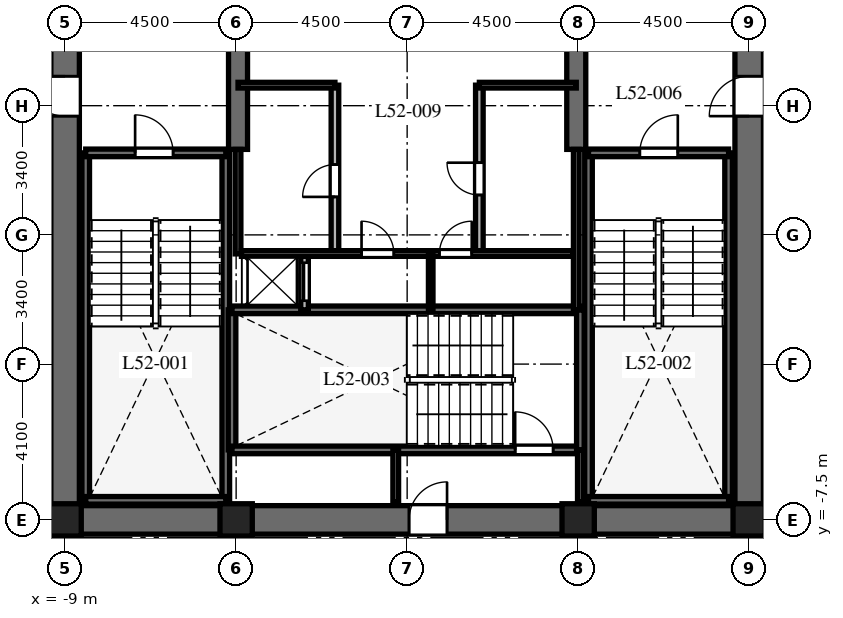
"""IFC4 building model, lengths in metres.
Left out: names, types, materials, properties, quantities, classifications, styles, units other than length and angle.
Written with IfcOpenShell. Run it as: python <this file> out.ifc"""

import sys

from ifc_helpers import new_model, si_unit, direction, frame, frame_2d, origin, origin_2d, place, context, subcontext, project, spatial, rectangle, extrude, element, fill, save


model = new_model("IFC4")
c1 = context("Model", 3, precision=1e-05, world=origin(), true_north=direction((0.0, 1.0)))
c2 = subcontext(c1, "Body", "Model", "MODEL_VIEW")
j1 = project(units=[si_unit("LENGTHUNIT", "METRE"), si_unit("PLANEANGLEUNIT", "RADIAN")], contexts=[c1])
p1 = place(None, origin())
s1 = spatial("IfcSite", under=j1, at=p1, CompositionType="ELEMENT")
p2 = place(p1, origin())
s2 = spatial("IfcBuilding", under=s1, at=p2, CompositionType="ELEMENT")
p3 = place(p2, frame((0.0, 0.0, 210.3)))
s3 = spatial("IfcBuildingStorey", under=s2, at=p3, CompositionType="ELEMENT", Elevation=210.3)
p4 = place(p3, frame((-9.375, -7.5, 0.0), z_axis=(0.0, 0.0, 1.0), x_axis=(1.0, 0.0, 0.0)))
e1 = element("IfcWall", 1, at=p4, inside=s3, PredefinedType="SHEAR", context=c2, shape_type="SweptSolid", body=[
    extrude(rectangle(XDim=18.75, YDim=0.75, at=frame_2d((9.375, 0.0))), origin(), (0.0, 0.0, 1.0), 3.8),
])
p5 = place(p4, frame((9.425, 0.0, 0.0)))
e2 = element("IfcOpeningElement", 2, at=p5, cuts=e1, PredefinedType="OPENING", context=c2, shape_type="SweptSolid", body=[
    extrude(rectangle(XDim=1.0, YDim=2.15, at=frame_2d((0.5, 1.075))), frame((0.0, 0.385, 0.0), z_axis=(0.0, -1.0, 0.0), x_axis=(1.0, 0.0, 0.0)), (0.0, 0.0, 1.0), 0.77),
])
p6 = place(p3, frame((-9.0, -7.125, 0.0), z_axis=(0.0, 0.0, 1.0), x_axis=(0.0, 1.0, 0.0)))
e3 = element("IfcWall", 3, at=p6, inside=s3, PredefinedType="SHEAR", context=c2, shape_type="SweptSolid", body=[
    extrude(rectangle(XDim=14.25, YDim=0.75, at=frame_2d((7.125, 0.0))), origin(), (0.0, 0.0, 1.0), 3.8),
])
p7 = place(p6, frame((10.25, 0.0, 0.0)))
e4 = element("IfcOpeningElement", 4, at=p7, cuts=e3, PredefinedType="OPENING", context=c2, shape_type="SweptSolid", body=[
    extrude(rectangle(XDim=1.05, YDim=2.15, at=frame_2d((0.525, 1.075))), frame((0.0, 0.385, 0.0), z_axis=(0.0, -1.0, 0.0), x_axis=(1.0, 0.0, 0.0)), (0.0, 0.0, 1.0), 0.77),
])
p8 = place(p3, frame((9.0, -7.125, 0.0), z_axis=(0.0, 0.0, 1.0), x_axis=(0.0, 1.0, 0.0)))
e5 = element("IfcWall", 5, at=p8, inside=s3, PredefinedType="SHEAR", context=c2, shape_type="SweptSolid", body=[
    extrude(rectangle(XDim=14.25, YDim=0.75, at=frame_2d((7.125, 0.0))), origin(), (0.0, 0.0, 1.0), 3.8),
])
p9 = place(p8, frame((10.25, 0.0, 0.0)))
e6 = element("IfcOpeningElement", 6, at=p9, cuts=e5, PredefinedType="OPENING", context=c2, shape_type="SweptSolid", body=[
    extrude(rectangle(XDim=1.05, YDim=2.15, at=frame_2d((0.525, 1.075))), frame((0.0, 0.385, 0.0), z_axis=(0.0, -1.0, 0.0), x_axis=(1.0, 0.0, 0.0)), (0.0, 0.0, 1.0), 0.77),
])
for number, where, z_axis, x_axis in (
    (7, (-4.45, 2.25, 0.0), (0.0, 0.0, 1.0), (0.0, 1.0, 0.0)),
    (8, (4.45, 2.25, 0.0), (0.0, 0.0, 1.0), (0.0, 1.0, 0.0)),
):
    element("IfcWall", number, at=place(p3, frame(where, z_axis=z_axis, x_axis=x_axis)), inside=s3, PredefinedType="SHEAR", context=c2, shape_type="SweptSolid", body=[
        extrude(rectangle(XDim=4.875, YDim=0.5, at=frame_2d((2.438, 0.0))), origin(), (0.0, 0.0, 1.0), 3.8),
    ])
for number, where, z_axis, x_axis in (
    (9, (-8.458, -6.985, 0.0), (0.0, 0.0, 1.0), (0.0, 1.0, 0.0)),
    (10, (-4.772, -6.985, 0.0), (0.0, 0.0, 1.0), (0.0, 1.0, 0.0)),
):
    element("IfcWall", number, at=place(p3, frame(where, z_axis=z_axis, x_axis=x_axis)), inside=s3, PredefinedType="SHEAR", context=c2, shape_type="SweptSolid", body=[
        extrude(rectangle(XDim=9.143, YDim=0.2, at=frame_2d((4.572, 0.0))), origin(), (0.0, 0.0, 1.0), 3.8),
    ])
p10 = place(p3, frame((-8.458, -6.985, 0.0), z_axis=(0.0, 0.0, 1.0), x_axis=(1.0, 0.0, 0.0)))
e11 = element("IfcWall", 11, at=p10, inside=s3, PredefinedType="SHEAR", context=c2, shape_type="SweptSolid", body=[
    extrude(rectangle(XDim=3.686, YDim=0.2, at=frame_2d((1.843, 0.0))), origin(), (0.0, 0.0, 1.0), 3.8),
])
p11 = place(p3, frame((-8.458, 2.158, 0.0), z_axis=(0.0, 0.0, 1.0), x_axis=(1.0, 0.0, 0.0)))
e12 = element("IfcWall", 12, at=p11, inside=s3, PredefinedType="SHEAR", context=c2, shape_type="SweptSolid", body=[
    extrude(rectangle(XDim=3.686, YDim=0.2, at=frame_2d((1.843, 0.0))), origin(), (0.0, 0.0, 1.0), 3.8),
])
p12 = place(p11, frame((1.3, 0.0, 0.0)))
e13 = element("IfcOpeningElement", 13, at=p12, cuts=e12, PredefinedType="OPENING", context=c2, shape_type="SweptSolid", body=[
    extrude(rectangle(XDim=1.0, YDim=2.15, at=frame_2d((0.5, 1.075))), frame((0.0, 0.11, 0.0), z_axis=(0.0, -1.0, 0.0), x_axis=(1.0, 0.0, 0.0)), (0.0, 0.0, 1.0), 0.22),
])
for number, where, z_axis, x_axis in (
    (14, (4.772, -6.985, 0.0), (0.0, 0.0, 1.0), (0.0, 1.0, 0.0)),
    (15, (8.458, -6.985, 0.0), (0.0, 0.0, 1.0), (0.0, 1.0, 0.0)),
):
    element("IfcWall", number, at=place(p3, frame(where, z_axis=z_axis, x_axis=x_axis)), inside=s3, PredefinedType="SHEAR", context=c2, shape_type="SweptSolid", body=[
        extrude(rectangle(XDim=9.143, YDim=0.2, at=frame_2d((4.572, 0.0))), origin(), (0.0, 0.0, 1.0), 3.8),
    ])
p13 = place(p3, frame((4.772, -6.985, 0.0), z_axis=(0.0, 0.0, 1.0), x_axis=(1.0, 0.0, 0.0)))
e16 = element("IfcWall", 16, at=p13, inside=s3, PredefinedType="SHEAR", context=c2, shape_type="SweptSolid", body=[
    extrude(rectangle(XDim=3.686, YDim=0.2, at=frame_2d((1.843, 0.0))), origin(), (0.0, 0.0, 1.0), 3.8),
])
p14 = place(p3, frame((4.772, 2.158, 0.0), z_axis=(0.0, 0.0, 1.0), x_axis=(1.0, 0.0, 0.0)))
e17 = element("IfcWall", 17, at=p14, inside=s3, PredefinedType="SHEAR", context=c2, shape_type="SweptSolid", body=[
    extrude(rectangle(XDim=3.686, YDim=0.2, at=frame_2d((1.843, 0.0))), origin(), (0.0, 0.0, 1.0), 3.8),
])
p15 = place(p14, frame((1.35, 0.0, 0.0)))
e18 = element("IfcOpeningElement", 18, at=p15, cuts=e17, PredefinedType="OPENING", context=c2, shape_type="SweptSolid", body=[
    extrude(rectangle(XDim=1.0, YDim=2.15, at=frame_2d((0.5, 1.075))), frame((0.0, 0.11, 0.0), z_axis=(0.0, -1.0, 0.0), x_axis=(1.0, 0.0, 0.0)), (0.0, 0.0, 1.0), 0.22),
])
p16 = place(p3, frame((-4.608, -5.658, 0.0), z_axis=(0.0, 0.0, 1.0), x_axis=(0.0, 1.0, 0.0)))
e19 = element("IfcWall", 19, at=p16, inside=s3, PredefinedType="SHEAR", context=c2, shape_type="SweptSolid", body=[
    extrude(rectangle(XDim=3.686, YDim=0.2, at=frame_2d((1.843, 0.0))), origin(), (0.0, 0.0, 1.0), 3.8),
])
p17 = place(p3, frame((-4.608, -5.658, 0.0), z_axis=(0.0, 0.0, 1.0), x_axis=(1.0, 0.0, 0.0)))
e20 = element("IfcWall", 20, at=p17, inside=s3, PredefinedType="SHEAR", context=c2, shape_type="SweptSolid", body=[
    extrude(rectangle(XDim=9.166, YDim=0.2, at=frame_2d((4.583, 0.0))), origin(), (0.0, 0.0, 1.0), 3.8),
])
p18 = place(p17, frame((7.45, 0.0, 0.0)))
e21 = element("IfcOpeningElement", 21, at=p18, cuts=e20, PredefinedType="OPENING", context=c2, shape_type="SweptSolid", body=[
    extrude(rectangle(XDim=1.0, YDim=2.15, at=frame_2d((0.5, 1.075))), frame((0.0, 0.11, 0.0), z_axis=(0.0, -1.0, 0.0), x_axis=(1.0, 0.0, 0.0)), (0.0, 0.0, 1.0), 0.22),
])
p19 = place(p3, frame((-4.608, -1.972, 0.0), z_axis=(0.0, 0.0, 1.0), x_axis=(1.0, 0.0, 0.0)))
e22 = element("IfcWall", 22, at=p19, inside=s3, PredefinedType="SHEAR", context=c2, shape_type="SweptSolid", body=[
    extrude(rectangle(XDim=9.166, YDim=0.2, at=frame_2d((4.583, 0.0))), origin(), (0.0, 0.0, 1.0), 3.8),
])
p20 = place(p3, frame((4.558, -5.658, 0.0), z_axis=(0.0, 0.0, 1.0), x_axis=(0.0, 1.0, 0.0)))
e23 = element("IfcWall", 23, at=p20, inside=s3, PredefinedType="SHEAR", context=c2, shape_type="SweptSolid", body=[
    extrude(rectangle(XDim=3.686, YDim=0.2, at=frame_2d((1.843, 0.0))), origin(), (0.0, 0.0, 1.0), 3.8),
])
for number, where, z_axis, x_axis in (
    (24, (-9.0, -7.5, 0.0), (0.0, 0.0, 1.0), (1.0, 0.0, 0.0)),
    (25, (-4.5, -7.5, 0.0), (0.0, 0.0, 1.0), (1.0, 0.0, 0.0)),
    (26, (4.5, -7.5, 0.0), (0.0, 0.0, 1.0), (1.0, 0.0, 0.0)),
    (27, (9.0, -7.5, 0.0), (0.0, 0.0, 1.0), (1.0, 0.0, 0.0)),
):
    element("IfcColumn", number, at=place(p3, frame(where, z_axis=z_axis, x_axis=x_axis)), inside=s3, PredefinedType="COLUMN", context=c2, shape_type="SweptSolid", body=[
        extrude(rectangle(XDim=0.85, YDim=0.85, at=origin_2d()), origin(), (0.0, 0.0, 1.0), 3.8),
    ])
for number, where, z_axis, x_axis in (
    (28, (-0.3, -7.02, 0.0), (0.0, 0.0, 1.0), (0.0, 1.0, 0.0)),
    (29, (4.558, -7.02, 0.0), (0.0, 0.0, 1.0), (0.0, 1.0, 0.0)),
):
    element("IfcWall", number, at=place(p3, frame(where, z_axis=z_axis, x_axis=x_axis)), inside=s3, PredefinedType="PARTITIONING", context=c2, shape_type="SweptSolid", body=[
        extrude(rectangle(XDim=1.362, YDim=0.15, at=frame_2d((0.681, 0.0))), origin(), (0.0, 0.0, 1.0), 3.5),
    ])
p21 = place(p3, frame((-2.7, -1.972, 0.0), z_axis=(0.0, 0.0, 1.0), x_axis=(0.0, 1.0, 0.0)))
e30 = element("IfcWall", 30, at=p21, inside=s3, PredefinedType="PARTITIONING", context=c2, shape_type="SweptSolid", body=[
    extrude(rectangle(XDim=1.472, YDim=0.2, at=frame_2d((0.736, 0.0))), origin(), (0.0, 0.0, 1.0), 3.5),
])
p22 = place(p21, frame((0.24, 0.0, 0.0)))
e31 = element("IfcOpeningElement", 31, at=p22, cuts=e30, PredefinedType="OPENING", context=c2, shape_type="SweptSolid", body=[
    extrude(rectangle(XDim=1.0, YDim=2.2, at=frame_2d((0.5, 1.1))), frame((0.0, 0.11, 0.0), z_axis=(0.0, -1.0, 0.0), x_axis=(1.0, 0.0, 0.0)), (0.0, 0.0, 1.0), 0.22),
])
p23 = place(p3, frame((-4.45, -0.5, 0.0), z_axis=(0.0, 0.0, 1.0), x_axis=(0.0, 1.0, 0.0)))
e32 = element("IfcWall", 32, at=p23, inside=s3, PredefinedType="PARTITIONING", context=c2, shape_type="SweptSolid", body=[
    extrude(rectangle(XDim=2.75, YDim=0.15, at=frame_2d((1.375, 0.0))), origin(), (0.0, 0.0, 1.0), 3.5),
])
p24 = place(p3, frame((4.45, -1.972, 0.0), z_axis=(0.0, 0.0, 1.0), x_axis=(0.0, 1.0, 0.0)))
e33 = element("IfcWall", 33, at=p24, inside=s3, PredefinedType="PARTITIONING", context=c2, shape_type="SweptSolid", body=[
    extrude(rectangle(XDim=4.222, YDim=0.15, at=frame_2d((2.111, 0.0))), origin(), (0.0, 0.0, 1.0), 3.5),
])
p25 = place(p3, frame((-1.9, -0.5, 0.0), z_axis=(0.0, 0.0, 1.0), x_axis=(0.0, 1.0, 0.0)))
e34 = element("IfcWall", 34, at=p25, inside=s3, PredefinedType="PARTITIONING", context=c2, shape_type="SweptSolid", body=[
    extrude(rectangle(XDim=4.44, YDim=0.2, at=frame_2d((2.22, 0.0))), origin(), (0.0, 0.0, 1.0), 3.5),
])
p26 = place(p25, frame((1.5, 0.0, 0.0)))
e35 = element("IfcOpeningElement", 35, at=p26, cuts=e34, PredefinedType="OPENING", context=c2, shape_type="SweptSolid", body=[
    extrude(rectangle(XDim=0.85, YDim=2.03, at=frame_2d((0.425, 1.015))), frame((0.0, 0.11, 0.0), z_axis=(0.0, -1.0, 0.0), x_axis=(1.0, 0.0, 0.0)), (0.0, 0.0, 1.0), 0.22),
])
p27 = place(p3, frame((-4.45, 3.94, 0.0), z_axis=(0.0, 0.0, 1.0), x_axis=(1.0, 0.0, 0.0)))
e36 = element("IfcWall", 36, at=p27, inside=s3, PredefinedType="PARTITIONING", context=c2, shape_type="SweptSolid", body=[
    extrude(rectangle(XDim=2.55, YDim=0.15, at=frame_2d((1.275, 0.0))), origin(), (0.0, 0.0, 1.0), 3.5),
])
p28 = place(p3, frame((1.9, -0.5, 0.0), z_axis=(0.0, 0.0, 1.0), x_axis=(0.0, 1.0, 0.0)))
e37 = element("IfcWall", 37, at=p28, inside=s3, PredefinedType="PARTITIONING", context=c2, shape_type="SweptSolid", body=[
    extrude(rectangle(XDim=4.44, YDim=0.2, at=frame_2d((2.22, 0.0))), origin(), (0.0, 0.0, 1.0), 3.5),
])
p29 = place(p28, frame((1.55, 0.0, 0.0)))
e38 = element("IfcOpeningElement", 38, at=p29, cuts=e37, PredefinedType="OPENING", context=c2, shape_type="SweptSolid", body=[
    extrude(rectangle(XDim=0.85, YDim=2.03, at=frame_2d((0.425, 1.015))), frame((0.0, 0.11, 0.0), z_axis=(0.0, -1.0, 0.0), x_axis=(1.0, 0.0, 0.0)), (0.0, 0.0, 1.0), 0.22),
])
p30 = place(p3, frame((1.9, 3.94, 0.0), z_axis=(0.0, 0.0, 1.0), x_axis=(1.0, 0.0, 0.0)))
e39 = element("IfcWall", 39, at=p30, inside=s3, PredefinedType="PARTITIONING", context=c2, shape_type="SweptSolid", body=[
    extrude(rectangle(XDim=2.55, YDim=0.15, at=frame_2d((1.275, 0.0))), origin(), (0.0, 0.0, 1.0), 3.5),
])
p31 = place(p3, frame((-4.36, -0.49, 0.0), z_axis=(0.0, 0.0, 1.0), x_axis=(1.0, 0.0, 0.0)))
e40 = element("IfcWall", 40, at=p31, inside=s3, PredefinedType="PARTITIONING", context=c2, shape_type="SweptSolid", body=[
    extrude(rectangle(XDim=8.72, YDim=0.15, at=frame_2d((4.36, 0.0))), origin(), (0.0, 0.0, 1.0), 3.5),
])
p32 = place(p31, frame((3.16, 0.0, 0.0)))
e41 = element("IfcOpeningElement", 41, at=p32, cuts=e40, PredefinedType="OPENING", context=c2, shape_type="SweptSolid", body=[
    extrude(rectangle(XDim=0.85, YDim=2.03, at=frame_2d((0.425, 1.015))), frame((0.0, 0.085, 0.0), z_axis=(0.0, -1.0, 0.0), x_axis=(1.0, 0.0, 0.0)), (0.0, 0.0, 1.0), 0.17),
])
p33 = place(p31, frame((5.21, 0.0, 0.0)))
e42 = element("IfcOpeningElement", 42, at=p33, cuts=e40, PredefinedType="OPENING", context=c2, shape_type="SweptSolid", body=[
    extrude(rectangle(XDim=0.85, YDim=2.03, at=frame_2d((0.425, 1.015))), frame((0.0, 0.085, 0.0), z_axis=(0.0, -1.0, 0.0), x_axis=(1.0, 0.0, 0.0)), (0.0, 0.0, 1.0), 0.17),
])
p34 = place(p3, frame((0.62, -1.972, 0.0), z_axis=(0.0, 0.0, 1.0), x_axis=(0.0, 1.0, 0.0)))
e43 = element("IfcWall", 43, at=p34, inside=s3, PredefinedType="PARTITIONING", context=c2, shape_type="SweptSolid", body=[
    extrude(rectangle(XDim=1.472, YDim=0.12, at=frame_2d((0.736, 0.0))), origin(), (0.0, 0.0, 1.0), 3.5),
])
p35 = place(p12, origin())
e44 = element("IfcDoor", 44, at=p35, inside=s3, OperationType="SINGLE_SWING_LEFT", PredefinedType="DOOR", context=c2, shape_type="SweptSolid", body=[
    extrude(rectangle(XDim=1.0, YDim=2.15, at=frame_2d((0.5, 1.075))), frame((0.0, 0.025, 0.0), z_axis=(0.0, -1.0, 0.0), x_axis=(1.0, 0.0, 0.0)), (0.0, 0.0, 1.0), 0.05),
])
fill(e13, e44)
p36 = place(p15, origin())
e45 = element("IfcDoor", 45, at=p36, inside=s3, OperationType="SINGLE_SWING_RIGHT", PredefinedType="DOOR", context=c2, shape_type="SweptSolid", body=[
    extrude(rectangle(XDim=1.0, YDim=2.15, at=frame_2d((0.5, 1.075))), frame((0.0, 0.025, 0.0), z_axis=(0.0, -1.0, 0.0), x_axis=(1.0, 0.0, 0.0)), (0.0, 0.0, 1.0), 0.05),
])
fill(e18, e45)
p37 = place(p18, origin())
e46 = element("IfcDoor", 46, at=p37, inside=s3, OperationType="SINGLE_SWING_LEFT", PredefinedType="DOOR", context=c2, shape_type="SweptSolid", body=[
    extrude(rectangle(XDim=1.0, YDim=2.15, at=frame_2d((0.5, 1.075))), frame((0.0, 0.025, 0.0), z_axis=(0.0, -1.0, 0.0), x_axis=(1.0, 0.0, 0.0)), (0.0, 0.0, 1.0), 0.05),
])
fill(e21, e46)
p38 = place(p5, origin())
e47 = element("IfcDoor", 47, at=p38, inside=s3, OperationType="SINGLE_SWING_RIGHT", PredefinedType="DOOR", context=c2, shape_type="SweptSolid", body=[
    extrude(rectangle(XDim=1.0, YDim=2.15, at=frame_2d((0.5, 1.075))), frame((0.0, 0.025, 0.0), z_axis=(0.0, -1.0, 0.0), x_axis=(1.0, 0.0, 0.0)), (0.0, 0.0, 1.0), 0.05),
])
fill(e2, e47)
p39 = place(p7, origin())
e48 = element("IfcDoor", 48, at=p39, inside=s3, OperationType="SINGLE_SWING_RIGHT", PredefinedType="DOOR", context=c2, shape_type="SweptSolid", body=[
    extrude(rectangle(XDim=1.05, YDim=2.15, at=frame_2d((0.525, 1.075))), frame((0.0, 0.025, 0.0), z_axis=(0.0, -1.0, 0.0), x_axis=(1.0, 0.0, 0.0)), (0.0, 0.0, 1.0), 0.05),
])
fill(e4, e48)
p40 = place(p9, origin())
e49 = element("IfcDoor", 49, at=p40, inside=s3, OperationType="SINGLE_SWING_LEFT", PredefinedType="DOOR", context=c2, shape_type="SweptSolid", body=[
    extrude(rectangle(XDim=1.05, YDim=2.15, at=frame_2d((0.525, 1.075))), frame((0.0, 0.025, 0.0), z_axis=(0.0, -1.0, 0.0), x_axis=(1.0, 0.0, 0.0)), (0.0, 0.0, 1.0), 0.05),
])
fill(e6, e49)
p41 = place(p22, origin())
e50 = element("IfcDoor", 50, at=p41, inside=s3, OperationType="SLIDING_TO_LEFT", PredefinedType="DOOR", context=c2, shape_type="SweptSolid", body=[
    extrude(rectangle(XDim=1.0, YDim=2.2, at=frame_2d((0.5, 1.1))), frame((0.0, 0.025, 0.0), z_axis=(0.0, -1.0, 0.0), x_axis=(1.0, 0.0, 0.0)), (0.0, 0.0, 1.0), 0.05),
])
fill(e31, e50)
p42 = place(p26, origin())
e51 = element("IfcDoor", 51, at=p42, inside=s3, OperationType="SINGLE_SWING_LEFT", PredefinedType="DOOR", context=c2, shape_type="SweptSolid", body=[
    extrude(rectangle(XDim=0.85, YDim=2.03, at=frame_2d((0.425, 1.015))), frame((0.0, 0.025, 0.0), z_axis=(0.0, -1.0, 0.0), x_axis=(1.0, 0.0, 0.0)), (0.0, 0.0, 1.0), 0.05),
])
fill(e35, e51)
p43 = place(p29, origin())
e52 = element("IfcDoor", 52, at=p43, inside=s3, OperationType="SINGLE_SWING_RIGHT", PredefinedType="DOOR", context=c2, shape_type="SweptSolid", body=[
    extrude(rectangle(XDim=0.85, YDim=2.03, at=frame_2d((0.425, 1.015))), frame((0.0, 0.025, 0.0), z_axis=(0.0, -1.0, 0.0), x_axis=(1.0, 0.0, 0.0)), (0.0, 0.0, 1.0), 0.05),
])
fill(e38, e52)
p44 = place(p32, origin())
e53 = element("IfcDoor", 53, at=p44, inside=s3, OperationType="SINGLE_SWING_LEFT", PredefinedType="DOOR", context=c2, shape_type="SweptSolid", body=[
    extrude(rectangle(XDim=0.85, YDim=2.03, at=frame_2d((0.425, 1.015))), frame((0.0, 0.025, 0.0), z_axis=(0.0, -1.0, 0.0), x_axis=(1.0, 0.0, 0.0)), (0.0, 0.0, 1.0), 0.05),
])
fill(e41, e53)
p45 = place(p33, origin())
e54 = element("IfcDoor", 54, at=p45, inside=s3, OperationType="SINGLE_SWING_RIGHT", PredefinedType="DOOR", context=c2, shape_type="SweptSolid", body=[
    extrude(rectangle(XDim=0.85, YDim=2.03, at=frame_2d((0.425, 1.015))), frame((0.0, 0.025, 0.0), z_axis=(0.0, -1.0, 0.0), x_axis=(1.0, 0.0, 0.0)), (0.0, 0.0, 1.0), 0.05),
])
fill(e42, e54)
save(model, sys.argv[1])
